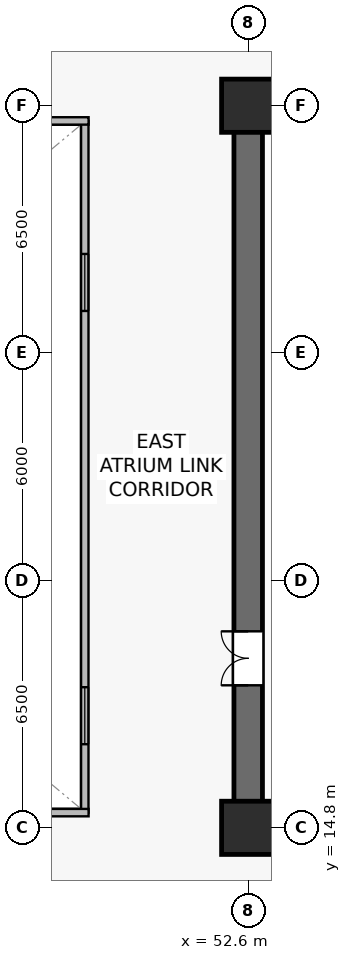
"""IFC4 building model, lengths in metres.
Left out: names, types, materials, properties, quantities, classifications, styles, units other than length and angle.
Written with IfcOpenShell. Run it as: python <this file> out.ifc"""

import sys

from ifc_helpers import new_model, si_unit, direction, frame, frame_2d, origin, origin_2d, place, context, subcontext, project, spatial, rectangle, extrude, source, transform, mapped, element, fill, save


model = new_model("IFC4")
c1 = context("Model", 3, precision=1e-05, world=origin(), true_north=direction((0.0, 1.0)))
c2 = subcontext(c1, "Body", "Model", "MODEL_VIEW")
j1 = project(units=[si_unit("LENGTHUNIT", "METRE"), si_unit("PLANEANGLEUNIT", "RADIAN")], contexts=[c1])
p1 = place(None, origin())
s1 = spatial("IfcSite", under=j1, at=p1, CompositionType="ELEMENT")
p2 = place(p1, origin())
s2 = spatial("IfcBuilding", under=s1, at=p2, CompositionType="ELEMENT")
p3 = place(p2, frame((0.0, 0.0, 49.8)))
s3 = spatial("IfcBuildingStorey", under=s2, at=p3, CompositionType="ELEMENT", Elevation=49.8)
p4 = place(p3, frame((52.225, 14.8, 0.0), z_axis=(0.0, 0.0, 1.0), x_axis=(1.0, 0.0, 0.0)))
e1 = element("IfcWall", 1, at=p4, inside=s3, PredefinedType="SHEAR", context=c2, shape_type="SweptSolid", body=[
    extrude(rectangle(XDim=15.55, YDim=0.75, at=frame_2d((7.775, 0.0))), origin(), (0.0, 0.0, 1.0), 3.78),
])
p5 = place(p3, frame((52.225, 33.8, 0.0), z_axis=(0.0, 0.0, 1.0), x_axis=(1.0, 0.0, 0.0)))
e2 = element("IfcWall", 2, at=p5, inside=s3, PredefinedType="SHEAR", context=c2, shape_type="SweptSolid", body=[
    extrude(rectangle(XDim=15.55, YDim=0.75, at=frame_2d((7.775, 0.0))), origin(), (0.0, 0.0, 1.0), 3.78),
])
p6 = place(p5, frame((9.3, 0.0, 0.0)))
e3 = element("IfcOpeningElement", 3, at=p6, cuts=e2, PredefinedType="OPENING", context=c2, shape_type="SweptSolid", body=[
    extrude(rectangle(XDim=0.95, YDim=2.15, at=frame_2d((0.475, 1.075))), frame((0.0, 0.385, 0.0), z_axis=(0.0, -1.0, 0.0), x_axis=(1.0, 0.0, 0.0)), (0.0, 0.0, 1.0), 0.77),
])
p7 = place(p5, frame((6.785, 0.0, 0.0)))
e4 = element("IfcOpeningElement", 4, at=p7, cuts=e2, PredefinedType="OPENING", context=c2, shape_type="SweptSolid", body=[
    extrude(rectangle(XDim=0.95, YDim=2.15, at=frame_2d((0.475, 1.075))), frame((0.0, 0.385, 0.0), z_axis=(0.0, -1.0, 0.0), x_axis=(1.0, 0.0, 0.0)), (0.0, 0.0, 1.0), 0.77),
])
p8 = place(p5, frame((4.235, 0.0, 0.0)))
e5 = element("IfcOpeningElement", 5, at=p8, cuts=e2, PredefinedType="OPENING", context=c2, shape_type="SweptSolid", body=[
    extrude(rectangle(XDim=0.95, YDim=2.15, at=frame_2d((0.475, 1.075))), frame((0.0, 0.385, 0.0), z_axis=(0.0, -1.0, 0.0), x_axis=(1.0, 0.0, 0.0)), (0.0, 0.0, 1.0), 0.77),
])
p9 = place(p5, frame((1.685, 0.0, 0.0)))
e6 = element("IfcOpeningElement", 6, at=p9, cuts=e2, PredefinedType="OPENING", context=c2, shape_type="SweptSolid", body=[
    extrude(rectangle(XDim=0.95, YDim=2.15, at=frame_2d((0.475, 1.075))), frame((0.0, 0.385, 0.0), z_axis=(0.0, -1.0, 0.0), x_axis=(1.0, 0.0, 0.0)), (0.0, 0.0, 1.0), 0.77),
])
p10 = place(p3, frame((52.6, 15.175, 0.0), z_axis=(0.0, 0.0, 1.0), x_axis=(0.0, 1.0, 0.0)))
e7 = element("IfcWall", 7, at=p10, inside=s3, PredefinedType="SHEAR", context=c2, shape_type="SweptSolid", body=[
    extrude(rectangle(XDim=18.25, YDim=0.75, at=frame_2d((9.125, 0.0))), origin(), (0.0, 0.0, 1.0), 3.78),
])
p11 = place(p10, frame((3.375, 0.0, 0.0)))
e8 = element("IfcOpeningElement", 8, at=p11, cuts=e7, PredefinedType="OPENING", context=c2, shape_type="SweptSolid", body=[
    extrude(rectangle(XDim=1.42, YDim=2.2, at=frame_2d((0.71, 1.1))), frame((0.0, 0.385, 0.0), z_axis=(0.0, -1.0, 0.0), x_axis=(1.0, 0.0, 0.0)), (0.0, 0.0, 1.0), 0.77),
])
m1 = source(origin(), c2, "Body", "SweptSolid", [
    extrude(rectangle(XDim=1.4, YDim=1.4, at=origin_2d()), origin(), (0.0, 0.0, 1.0), 4.1),
])
for number, where, z_axis, x_axis in (
    (9, (52.6, 14.8, 0.0), (0.0, 0.0, 1.0), (1.0, 0.0, 0.0)),
    (10, (52.6, 33.8, 0.0), (0.0, 0.0, 1.0), (1.0, 0.0, 0.0)),
):
    element("IfcColumn", number, at=place(p3, frame(where, z_axis=z_axis, x_axis=x_axis)), inside=s3, PredefinedType="COLUMN", context=c2, shape_type="MappedRepresentation", body=[
        mapped(m1, transform((0.0, 0.0, 0.0), scale=1.0)),
    ])
p12 = place(p3, frame((48.3, 15.2, 0.0), z_axis=(0.0, 0.0, 1.0), x_axis=(0.0, 1.0, 0.0)))
e11 = element("IfcWall", 11, at=p12, inside=s3, PredefinedType="SOLIDWALL", context=c2, shape_type="SweptSolid", body=[
    extrude(rectangle(XDim=18.2, YDim=0.195, at=frame_2d((9.1, 0.0))), origin(), (0.0, 0.0, 1.0), 3.78),
])
p13 = place(p12, frame((1.8, 0.0, 0.9)))
e12 = element("IfcOpeningElement", 12, at=p13, cuts=e11, PredefinedType="OPENING", context=c2, shape_type="SweptSolid", body=[
    extrude(rectangle(XDim=1.5, YDim=1.4, at=frame_2d((0.75, 0.7))), frame((0.0, 0.107, 0.0), z_axis=(0.0, -1.0, 0.0), x_axis=(1.0, 0.0, 0.0)), (0.0, 0.0, 1.0), 0.215),
])
p14 = place(p12, frame((13.2, 0.0, 0.9)))
e13 = element("IfcOpeningElement", 13, at=p14, cuts=e11, PredefinedType="OPENING", context=c2, shape_type="SweptSolid", body=[
    extrude(rectangle(XDim=1.5, YDim=1.4, at=frame_2d((0.75, 0.7))), frame((0.0, 0.107, 0.0), z_axis=(0.0, -1.0, 0.0), x_axis=(1.0, 0.0, 0.0)), (0.0, 0.0, 1.0), 0.215),
])
for number, where, z_axis, x_axis in (
    (14, (26.4, 15.2, 0.0), (0.0, 0.0, 1.0), (1.0, 0.0, 0.0)),
    (15, (26.4, 33.4, 0.0), (0.0, 0.0, 1.0), (1.0, 0.0, 0.0)),
):
    element("IfcWall", number, at=place(p3, frame(where, z_axis=z_axis, x_axis=x_axis)), inside=s3, PredefinedType="SOLIDWALL", context=c2, shape_type="SweptSolid", body=[
        extrude(rectangle(XDim=22.0, YDim=0.195, at=frame_2d((11.0, 0.0))), origin(), (0.0, 0.0, 1.0), 3.78),
    ])
m2 = source(origin(), c2, "Body", "SweptSolid", [
    extrude(rectangle(XDim=1.5, YDim=1.4, at=frame_2d((0.75, 0.7))), frame((0.0, 0.03, 0.0), z_axis=(0.0, -1.0, 0.0), x_axis=(1.0, 0.0, 0.0)), (0.0, 0.0, 1.0), 0.06),
])
p15 = place(p13, origin())
e16 = element("IfcWindow", 16, at=p15, inside=s3, PartitioningType="SINGLE_PANEL", PredefinedType="WINDOW", context=c2, shape_type="MappedRepresentation", body=[
    mapped(m2, transform((0.0, 0.0, 0.0), scale=1.0)),
])
fill(e12, e16)
p16 = place(p14, origin())
e17 = element("IfcWindow", 17, at=p16, inside=s3, PartitioningType="SINGLE_PANEL", PredefinedType="WINDOW", context=c2, shape_type="MappedRepresentation", body=[
    mapped(m2, transform((0.0, 0.0, 0.0), scale=1.0)),
])
fill(e13, e17)
m3 = source(origin(), c2, "Body", "SweptSolid", [
    extrude(rectangle(XDim=1.42, YDim=2.2, at=frame_2d((0.71, 1.1))), frame((0.0, 0.025, 0.0), z_axis=(0.0, -1.0, 0.0), x_axis=(1.0, 0.0, 0.0)), (0.0, 0.0, 1.0), 0.05),
])
p17 = place(p11, origin())
e18 = element("IfcDoor", 18, at=p17, inside=s3, OperationType="DOUBLE_DOOR_SINGLE_SWING", PredefinedType="DOOR", context=c2, shape_type="MappedRepresentation", body=[
    mapped(m3, transform((0.0, 0.0, 0.0), scale=1.0)),
])
fill(e8, e18)
save(model, sys.argv[1])
